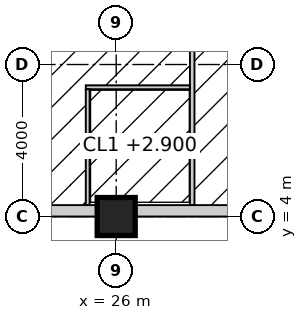
"""IFC4 building model, lengths in metres.
Left out: names, types, materials, properties, quantities, classifications, styles, units other than length and angle.
Written with IfcOpenShell. Run it as: python <this file> out.ifc"""

import sys

from ifc_helpers import new_model, si_unit, direction, frame, frame_2d, origin, origin_2d, place, context, subcontext, project, spatial, rectangle, hollow_rectangle, extrude, element, fill, save


model = new_model("IFC4")
c1 = context("Model", 3, precision=1e-05, world=origin(), true_north=direction((0.0, 1.0)))
c2 = subcontext(c1, "Body", "Model", "MODEL_VIEW")
j1 = project(units=[si_unit("LENGTHUNIT", "METRE"), si_unit("PLANEANGLEUNIT", "RADIAN")], contexts=[c1])
p1 = place(None, origin())
s1 = spatial("IfcSite", under=j1, at=p1, CompositionType="ELEMENT")
p2 = place(p1, origin())
s2 = spatial("IfcBuilding", under=s1, at=p2, CompositionType="ELEMENT")
p3 = place(p2, frame((0.0, 0.0, 254.2)))
s3 = spatial("IfcBuildingStorey", under=s2, at=p3, CompositionType="ELEMENT", Elevation=254.2)
p4 = place(p3, frame((26.0, 4.0, 0.0), z_axis=(0.0, 0.0, 1.0), x_axis=(1.0, 0.0, 0.0)))
e1 = element("IfcColumn", 1, at=p4, inside=s3, PredefinedType="COLUMN", context=c2, shape_type="SweptSolid", body=[
    extrude(hollow_rectangle(XDim=1.0, YDim=1.0, WallThickness=0.1, at=origin_2d()), origin(), (0.0, 0.0, 1.0), 4.0),
])
p5 = place(p3, frame((28.0, 4.3, 0.0), z_axis=(0.0, 0.0, 1.0), x_axis=(0.0, 1.0, 0.0)))
e2 = element("IfcWall", 2, at=p5, inside=s3, PredefinedType="PARTITIONING", context=c2, shape_type="SweptSolid", body=[
    extrude(rectangle(XDim=10.725, YDim=0.12, at=frame_2d((5.362, 0.0))), origin(), (0.0, 0.0, 1.0), 3.85),
])
p6 = place(p3, frame((25.2, 7.4, 0.0), z_axis=(0.0, 0.0, 1.0), x_axis=(1.0, 0.0, 0.0)))
e3 = element("IfcWall", 3, at=p6, inside=s3, PredefinedType="PARTITIONING", context=c2, shape_type="SweptSolid", body=[
    extrude(rectangle(XDim=2.74, YDim=0.1, at=frame_2d((1.37, 0.0))), origin(), (0.0, 0.0, 1.0), 3.85),
])
p7 = place(p3, frame((25.25, 4.3, 0.0), z_axis=(0.0, 0.0, 1.0), x_axis=(0.0, 1.0, 0.0)))
e4 = element("IfcWall", 4, at=p7, inside=s3, PredefinedType="PARTITIONING", context=c2, shape_type="SweptSolid", body=[
    extrude(rectangle(XDim=3.05, YDim=0.1, at=frame_2d((1.525, 0.0))), origin(), (0.0, 0.0, 1.0), 3.85),
])
p8 = place(p7, frame((1.05, 0.0, 0.0)))
e5 = element("IfcOpeningElement", 5, at=p8, cuts=e4, PredefinedType="OPENING", context=c2, shape_type="SweptSolid", body=[
    extrude(rectangle(XDim=1.0, YDim=2.2, at=frame_2d((0.5, 1.1))), frame((0.0, 0.06, 0.0), z_axis=(0.0, -1.0, 0.0), x_axis=(1.0, 0.0, 0.0)), (0.0, 0.0, 1.0), 0.12),
])
p9 = place(p3, frame((22.5, 4.15, 0.0), z_axis=(0.0, 0.0, 1.0), x_axis=(1.0, 0.0, 0.0)))
e6 = element("IfcWall", 6, at=p9, inside=s3, PredefinedType="ELEMENTEDWALL", context=c2, shape_type="SweptSolid", body=[
    extrude(rectangle(XDim=3.0, YDim=0.3, at=frame_2d((1.5, 0.0))), origin(), (0.0, 0.0, 1.0), 2.85),
])
p10 = place(p9, frame((0.5, 0.0, 0.8)))
e7 = element("IfcOpeningElement", 7, at=p10, cuts=e6, PredefinedType="OPENING", context=c2, shape_type="SweptSolid", body=[
    extrude(rectangle(XDim=2.0, YDim=2.0, at=frame_2d((1.0, 1.0))), frame((0.0, 0.16, 0.0), z_axis=(0.0, -1.0, 0.0), x_axis=(1.0, 0.0, 0.0)), (0.0, 0.0, 1.0), 0.32),
])
p11 = place(p3, frame((26.5, 4.15, 0.0), z_axis=(0.0, 0.0, 1.0), x_axis=(1.0, 0.0, 0.0)))
e8 = element("IfcWall", 8, at=p11, inside=s3, PredefinedType="ELEMENTEDWALL", context=c2, shape_type="SweptSolid", body=[
    extrude(rectangle(XDim=3.0, YDim=0.3, at=frame_2d((1.5, 0.0))), origin(), (0.0, 0.0, 1.0), 2.85),
])
p12 = place(p11, frame((0.3, 0.0, 0.8)))
e9 = element("IfcOpeningElement", 9, at=p12, cuts=e8, PredefinedType="OPENING", context=c2, shape_type="SweptSolid", body=[
    extrude(rectangle(XDim=1.0, YDim=2.0, at=frame_2d((0.5, 1.0))), frame((0.0, 0.16, 0.0), z_axis=(0.0, -1.0, 0.0), x_axis=(1.0, 0.0, 0.0)), (0.0, 0.0, 1.0), 0.32),
])
p13 = place(p11, frame((1.7, 0.0, 0.8)))
e10 = element("IfcOpeningElement", 10, at=p13, cuts=e8, PredefinedType="OPENING", context=c2, shape_type="SweptSolid", body=[
    extrude(rectangle(XDim=1.0, YDim=2.0, at=frame_2d((0.5, 1.0))), frame((0.0, 0.16, 0.0), z_axis=(0.0, -1.0, 0.0), x_axis=(1.0, 0.0, 0.0)), (0.0, 0.0, 1.0), 0.32),
])
p14 = place(p8, origin())
e11 = element("IfcDoor", 11, at=p14, inside=s3, OperationType="SINGLE_SWING_LEFT", PredefinedType="DOOR", context=c2, shape_type="SweptSolid", body=[
    extrude(rectangle(XDim=1.0, YDim=2.2, at=frame_2d((0.5, 1.1))), frame((0.0, 0.025, 0.0), z_axis=(0.0, -1.0, 0.0), x_axis=(1.0, 0.0, 0.0)), (0.0, 0.0, 1.0), 0.05),
])
fill(e5, e11)
p15 = place(p10, origin())
e12 = element("IfcWindow", 12, at=p15, inside=s3, PartitioningType="SINGLE_PANEL", PredefinedType="WINDOW", context=c2, shape_type="SweptSolid", body=[
    extrude(rectangle(XDim=2.0, YDim=2.0, at=frame_2d((1.0, 1.0))), frame((0.0, 0.03, 0.0), z_axis=(0.0, -1.0, 0.0), x_axis=(1.0, 0.0, 0.0)), (0.0, 0.0, 1.0), 0.06),
])
fill(e7, e12)
p16 = place(p12, origin())
e13 = element("IfcWindow", 13, at=p16, inside=s3, PartitioningType="SINGLE_PANEL", PredefinedType="WINDOW", context=c2, shape_type="SweptSolid", body=[
    extrude(rectangle(XDim=1.0, YDim=2.0, at=frame_2d((0.5, 1.0))), frame((0.0, 0.03, 0.0), z_axis=(0.0, -1.0, 0.0), x_axis=(1.0, 0.0, 0.0)), (0.0, 0.0, 1.0), 0.06),
])
fill(e9, e13)
p17 = place(p13, origin())
e14 = element("IfcWindow", 14, at=p17, inside=s3, PartitioningType="SINGLE_PANEL", PredefinedType="WINDOW", context=c2, shape_type="SweptSolid", body=[
    extrude(rectangle(XDim=1.0, YDim=2.0, at=frame_2d((0.5, 1.0))), frame((0.0, 0.03, 0.0), z_axis=(0.0, -1.0, 0.0), x_axis=(1.0, 0.0, 0.0)), (0.0, 0.0, 1.0), 0.06),
])
fill(e10, e14)
save(model, sys.argv[1])
